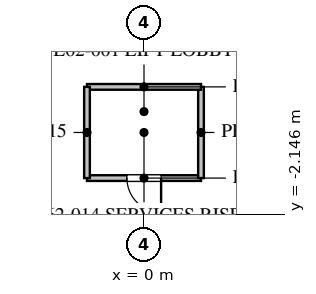
"""IFC4 building model, lengths in metres.
Left out: names, types, materials, properties, quantities, classifications, styles, units other than length and angle.
Written with IfcOpenShell. Run it as: python <this file> out.ifc"""

import sys

from ifc_helpers import new_model, si_unit, direction, frame, frame_2d, origin, place, context, subcontext, project, spatial, rectangle, extrude, element, fill, save


model = new_model("IFC4")
c1 = context("Model", 3, precision=1e-05, world=origin(), true_north=direction((0.0, 1.0)))
c2 = subcontext(c1, "Body", "Model", "MODEL_VIEW")
j1 = project(units=[si_unit("LENGTHUNIT", "METRE"), si_unit("PLANEANGLEUNIT", "RADIAN")], contexts=[c1])
p1 = place(None, origin())
s1 = spatial("IfcSite", under=j1, at=p1, CompositionType="ELEMENT")
p2 = place(p1, origin())
s2 = spatial("IfcBuilding", under=s1, at=p2, CompositionType="ELEMENT")
p3 = place(p2, frame((0.0, 0.0, 271.3)))
s3 = spatial("IfcBuildingStorey", under=s2, at=p3, CompositionType="ELEMENT", Elevation=271.3)
p4 = place(p3, frame((-1.5, -1.2, 0.0), z_axis=(0.0, 0.0, 1.0), x_axis=(1.0, 0.0, 0.0)))
e1 = element("IfcWall", 1, at=p4, inside=s3, PredefinedType="PARTITIONING", context=c2, shape_type="SweptSolid", body=[
    extrude(rectangle(XDim=3.0, YDim=0.15, at=frame_2d((1.5, 0.0))), origin(), (0.0, 0.0, 1.0), 4.8),
])
p5 = place(p4, frame((1.05, 0.0, 0.0)))
e2 = element("IfcOpeningElement", 2, at=p5, cuts=e1, PredefinedType="OPENING", context=c2, shape_type="SweptSolid", body=[
    extrude(rectangle(XDim=0.9, YDim=2.1, at=frame_2d((0.45, 1.05))), frame((0.0, 0.085, 0.0), z_axis=(0.0, -1.0, 0.0), x_axis=(1.0, 0.0, 0.0)), (0.0, 0.0, 1.0), 0.17),
])
p6 = place(p3, frame((1.5, -1.2, 0.0), z_axis=(0.0, 0.0, 1.0), x_axis=(0.0, 1.0, 0.0)))
e3 = element("IfcWall", 3, at=p6, inside=s3, PredefinedType="PARTITIONING", context=c2, shape_type="SweptSolid", body=[
    extrude(rectangle(XDim=2.4, YDim=0.15, at=frame_2d((1.2, 0.0))), origin(), (0.0, 0.0, 1.0), 4.8),
])
p7 = place(p3, frame((1.5, 1.2, 0.0), z_axis=(0.0, 0.0, 1.0), x_axis=(-1.0, 0.0, 0.0)))
e4 = element("IfcWall", 4, at=p7, inside=s3, PredefinedType="PARTITIONING", context=c2, shape_type="SweptSolid", body=[
    extrude(rectangle(XDim=3.0, YDim=0.15, at=frame_2d((1.5, 0.0))), origin(), (0.0, 0.0, 1.0), 4.8),
])
p8 = place(p3, frame((-1.5, 1.2, 0.0), z_axis=(0.0, 0.0, 1.0), x_axis=(0.0, -1.0, 0.0)))
e5 = element("IfcWall", 5, at=p8, inside=s3, PredefinedType="PARTITIONING", context=c2, shape_type="SweptSolid", body=[
    extrude(rectangle(XDim=2.4, YDim=0.15, at=frame_2d((1.2, 0.0))), origin(), (0.0, 0.0, 1.0), 4.8),
])
p9 = place(p5, frame((0.9, 0.0, 0.0), z_axis=(0.0, 0.0, 1.0), x_axis=(-1.0, 0.0, 0.0)))
e6 = element("IfcDoor", 6, at=p9, inside=s3, OperationType="SINGLE_SWING_LEFT", PredefinedType="DOOR", context=c2, shape_type="SweptSolid", body=[
    extrude(rectangle(XDim=0.9, YDim=2.1, at=frame_2d((0.45, 1.05))), frame((0.0, 0.025, 0.0), z_axis=(0.0, -1.0, 0.0), x_axis=(1.0, 0.0, 0.0)), (0.0, 0.0, 1.0), 0.05),
])
fill(e2, e6)
save(model, sys.argv[1])
